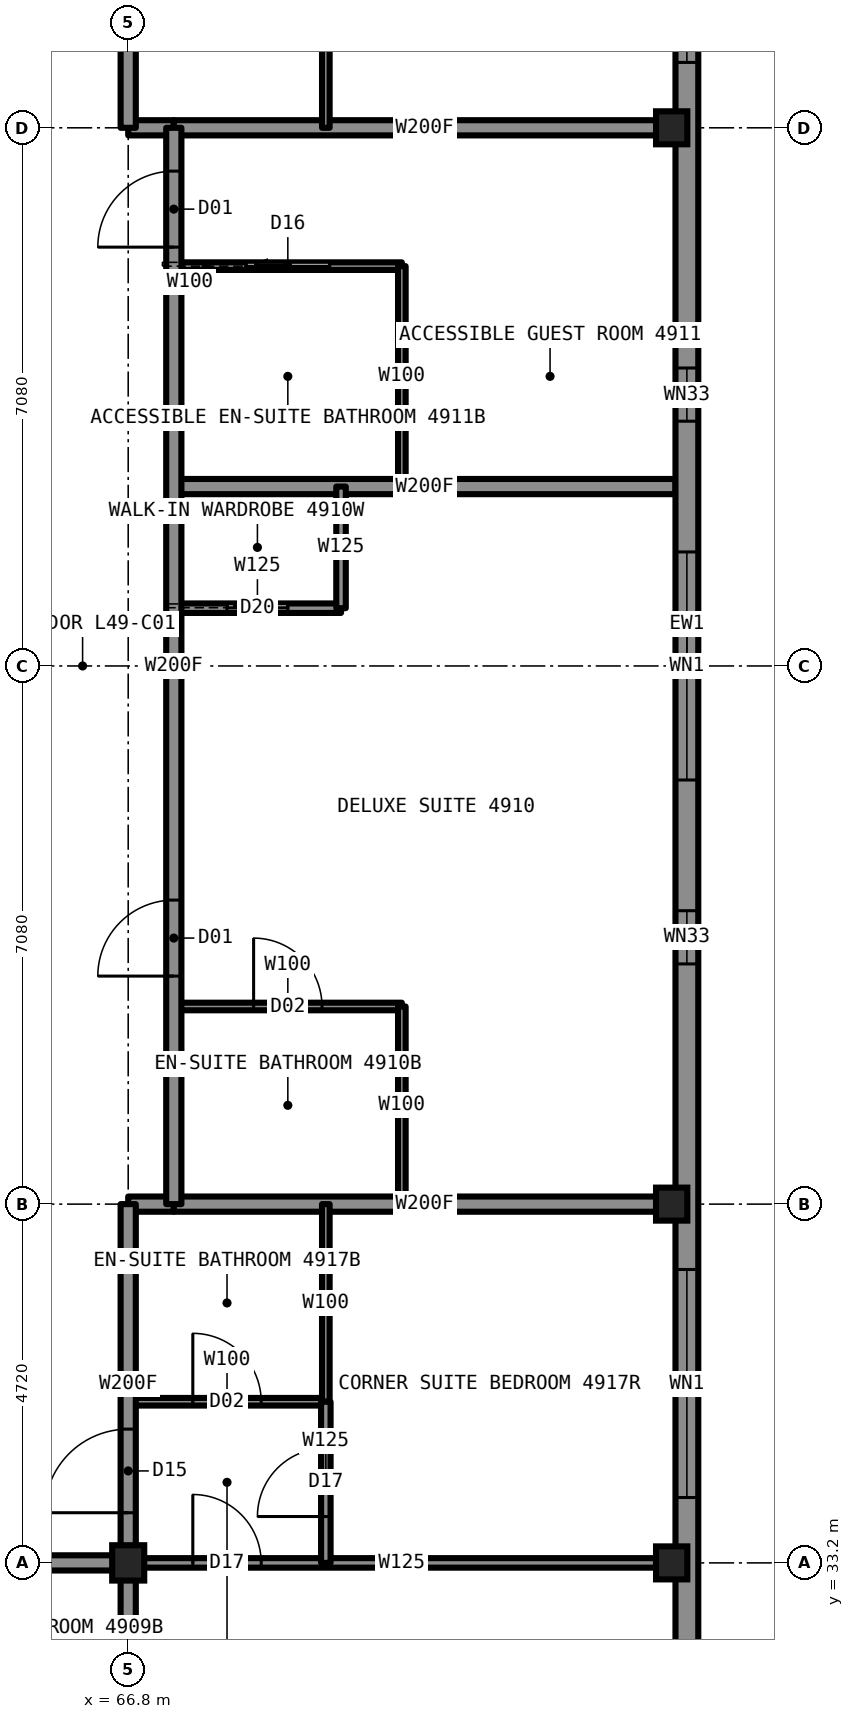
"""IFC4 building model, lengths in metres.
Left out: names, types, materials, properties, quantities, classifications, styles, units other than length and angle.
Written with IfcOpenShell. Run it as: python <this file> out.ifc"""

import sys

from ifc_helpers import new_model, si_unit, direction, frame, frame_2d, origin, origin_2d, place, context, subcontext, project, spatial, rectangle, i_section, extrude, element, fill, save


model = new_model("IFC4")
c1 = context("Model", 3, precision=1e-05, world=origin(), true_north=direction((0.0, 1.0)))
c2 = subcontext(c1, "Body", "Model", "MODEL_VIEW")
j1 = project(units=[si_unit("LENGTHUNIT", "METRE"), si_unit("PLANEANGLEUNIT", "RADIAN")], contexts=[c1])
p1 = place(None, origin())
s1 = spatial("IfcSite", under=j1, at=p1, CompositionType="ELEMENT")
p2 = place(p1, origin())
s2 = spatial("IfcBuilding", under=s1, at=p2, CompositionType="ELEMENT")
p3 = place(p2, frame((0.0, 0.0, 182.8)))
s3 = spatial("IfcBuildingStorey", under=s2, at=p3, CompositionType="ELEMENT", Elevation=182.8)
for number, where, z_axis, x_axis in (
    (1, (73.95, 33.2, 0.0), (0.0, 0.0, 1.0), (1.0, 0.0, 0.0)),
    (2, (73.95, 37.92, 0.0), (0.0, 0.0, 1.0), (1.0, 0.0, 0.0)),
    (3, (73.95, 52.08, 0.0), (0.0, 0.0, 1.0), (1.0, 0.0, 0.0)),
):
    element("IfcColumn", number, at=place(p3, frame(where, z_axis=z_axis, x_axis=x_axis)), inside=s3, PredefinedType="COLUMN", context=c2, shape_type="SweptSolid", body=[
        extrude(i_section(OverallWidth=0.411, OverallDepth=0.434, WebThickness=0.036, FlangeThickness=0.057, at=origin_2d()), origin(), (0.0, 0.0, 1.0), 3.5),
    ])
p4 = place(p3, frame((66.8, 33.2, 0.0), z_axis=(0.0, 0.0, 1.0), x_axis=(1.0, 0.0, 0.0)))
e4 = element("IfcColumn", 4, at=p4, inside=s3, PredefinedType="COLUMN", context=c2, shape_type="SweptSolid", body=[
    extrude(i_section(OverallWidth=0.422, OverallDepth=0.465, WebThickness=0.045, FlangeThickness=0.073, at=origin_2d()), origin(), (0.0, 0.0, 1.0), 3.5),
])
p5 = place(p3, frame((43.2, 33.2, 0.0), z_axis=(0.0, 0.0, 1.0), x_axis=(1.0, 0.0, 0.0)))
e5 = element("IfcWall", 5, at=p5, inside=s3, PredefinedType="PARTITIONING", context=c2, shape_type="SweptSolid", body=[
    extrude(rectangle(XDim=23.6, YDim=0.2, at=frame_2d((11.8, 0.0))), origin(), (0.0, 0.0, 1.0), 3.33),
])
p6 = place(p5, frame((3.0, 0.0, 0.0)))
e6 = element("IfcOpeningElement", 6, at=p6, cuts=e5, PredefinedType="OPENING", context=c2, shape_type="SweptSolid", body=[
    extrude(rectangle(XDim=1.0, YDim=2.2, at=frame_2d((0.5, 1.1))), frame((0.0, 0.11, 0.0), z_axis=(0.0, -1.0, 0.0), x_axis=(1.0, 0.0, 0.0)), (0.0, 0.0, 1.0), 0.22),
])
p7 = place(p5, frame((11.99, 0.0, 0.0)))
e7 = element("IfcOpeningElement", 7, at=p7, cuts=e5, PredefinedType="OPENING", context=c2, shape_type="SweptSolid", body=[
    extrude(rectangle(XDim=1.0, YDim=2.2, at=frame_2d((0.5, 1.1))), frame((0.0, 0.11, 0.0), z_axis=(0.0, -1.0, 0.0), x_axis=(1.0, 0.0, 0.0)), (0.0, 0.0, 1.0), 0.22),
])
p8 = place(p5, frame((16.71, 0.0, 0.0)))
e8 = element("IfcOpeningElement", 8, at=p8, cuts=e5, PredefinedType="OPENING", context=c2, shape_type="SweptSolid", body=[
    extrude(rectangle(XDim=1.0, YDim=2.2, at=frame_2d((0.5, 1.1))), frame((0.0, 0.11, 0.0), z_axis=(0.0, -1.0, 0.0), x_axis=(1.0, 0.0, 0.0)), (0.0, 0.0, 1.0), 0.22),
])
p9 = place(p5, frame((19.28, 0.0, 0.0)))
e9 = element("IfcOpeningElement", 9, at=p9, cuts=e5, PredefinedType="OPENING", context=c2, shape_type="SweptSolid", body=[
    extrude(rectangle(XDim=1.0, YDim=2.2, at=frame_2d((0.5, 1.1))), frame((0.0, 0.11, 0.0), z_axis=(0.0, -1.0, 0.0), x_axis=(1.0, 0.0, 0.0)), (0.0, 0.0, 1.0), 0.22),
])
p10 = place(p3, frame((66.8, 33.2, 0.0), z_axis=(0.0, 0.0, 1.0), x_axis=(1.0, 0.0, 0.0)))
e10 = element("IfcWall", 10, at=p10, inside=s3, PredefinedType="PARTITIONING", context=c2, shape_type="SweptSolid", body=[
    extrude(rectangle(XDim=7.2, YDim=0.125, at=frame_2d((3.6, 0.0))), origin(), (0.0, 0.0, 1.0), 2.573),
])
p11 = place(p10, frame((0.85, 0.0, 0.0)))
e11 = element("IfcOpeningElement", 11, at=p11, cuts=e10, PredefinedType="OPENING", context=c2, shape_type="SweptSolid", body=[
    extrude(rectangle(XDim=0.9, YDim=2.2, at=frame_2d((0.45, 1.1))), frame((0.0, 0.073, 0.0), z_axis=(0.0, -1.0, 0.0), x_axis=(1.0, 0.0, 0.0)), (0.0, 0.0, 1.0), 0.145),
])
p12 = place(p3, frame((67.4, 40.52, 0.0), z_axis=(0.0, 0.0, 1.0), x_axis=(1.0, 0.0, 0.0)))
e12 = element("IfcWall", 12, at=p12, inside=s3, PredefinedType="PARTITIONING", context=c2, shape_type="SweptSolid", body=[
    extrude(rectangle(XDim=3.0, YDim=0.1, at=frame_2d((1.5, 0.0))), origin(), (0.0, 0.0, 1.0), 3.33),
])
p13 = place(p12, frame((1.05, 0.0, 0.0)))
e13 = element("IfcOpeningElement", 13, at=p13, cuts=e12, PredefinedType="OPENING", context=c2, shape_type="SweptSolid", body=[
    extrude(rectangle(XDim=0.9, YDim=2.1, at=frame_2d((0.45, 1.05))), frame((0.0, 0.06, 0.0), z_axis=(0.0, -1.0, 0.0), x_axis=(1.0, 0.0, 0.0)), (0.0, 0.0, 1.0), 0.12),
])
p14 = place(p3, frame((66.8, 37.92, 0.0), z_axis=(0.0, 0.0, 1.0), x_axis=(1.0, 0.0, 0.0)))
e14 = element("IfcWall", 14, at=p14, inside=s3, PredefinedType="PARTITIONING", context=c2, shape_type="SweptSolid", body=[
    extrude(rectangle(XDim=0.6, YDim=0.2, at=frame_2d((0.3, 0.0))), origin(), (0.0, 0.0, 1.0), 2.573),
])
p15 = place(p3, frame((67.4, 37.92, 0.0), z_axis=(0.0, 0.0, 1.0), x_axis=(1.0, 0.0, 0.0)))
e15 = element("IfcWall", 15, at=p15, inside=s3, PredefinedType="PARTITIONING", context=c2, shape_type="SweptSolid", body=[
    extrude(rectangle(XDim=6.6, YDim=0.2, at=frame_2d((3.3, 0.0))), origin(), (0.0, 0.0, 1.0), 2.573),
])
p16 = place(p3, frame((66.8, 35.32, 0.0), z_axis=(0.0, 0.0, 1.0), x_axis=(1.0, 0.0, 0.0)))
e16 = element("IfcWall", 16, at=p16, inside=s3, PredefinedType="PARTITIONING", context=c2, shape_type="SweptSolid", body=[
    extrude(rectangle(XDim=2.6, YDim=0.1, at=frame_2d((1.3, 0.0))), origin(), (0.0, 0.0, 1.0), 3.33),
])
p17 = place(p16, frame((0.85, 0.0, 0.0)))
e17 = element("IfcOpeningElement", 17, at=p17, cuts=e16, PredefinedType="OPENING", context=c2, shape_type="SweptSolid", body=[
    extrude(rectangle(XDim=0.9, YDim=2.1, at=frame_2d((0.45, 1.05))), frame((0.0, 0.06, 0.0), z_axis=(0.0, -1.0, 0.0), x_axis=(1.0, 0.0, 0.0)), (0.0, 0.0, 1.0), 0.12),
])
p18 = place(p3, frame((67.4, 45.76, 0.0), z_axis=(0.0, 0.0, 1.0), x_axis=(1.0, 0.0, 0.0)))
e18 = element("IfcWall", 18, at=p18, inside=s3, PredefinedType="PARTITIONING", context=c2, shape_type="SweptSolid", body=[
    extrude(rectangle(XDim=2.2, YDim=0.125, at=frame_2d((1.1, 0.0))), origin(), (0.0, 0.0, 1.0), 3.33),
])
p19 = place(p18, frame((0.7, 0.0, 0.0)))
e19 = element("IfcOpeningElement", 19, at=p19, cuts=e18, PredefinedType="OPENING", context=c2, shape_type="SweptSolid", body=[
    extrude(rectangle(XDim=0.8, YDim=2.1, at=frame_2d((0.4, 1.05))), frame((0.0, 0.073, 0.0), z_axis=(0.0, -1.0, 0.0), x_axis=(1.0, 0.0, 0.0)), (0.0, 0.0, 1.0), 0.145),
])
p20 = place(p3, frame((67.4, 47.36, 0.0), z_axis=(0.0, 0.0, 1.0), x_axis=(1.0, 0.0, 0.0)))
e20 = element("IfcWall", 20, at=p20, inside=s3, PredefinedType="PARTITIONING", context=c2, shape_type="SweptSolid", body=[
    extrude(rectangle(XDim=6.6, YDim=0.2, at=frame_2d((3.3, 0.0))), origin(), (0.0, 0.0, 1.0), 2.73),
])
p21 = place(p3, frame((67.4, 50.26, 0.0), z_axis=(0.0, 0.0, 1.0), x_axis=(1.0, 0.0, 0.0)))
e21 = element("IfcWall", 21, at=p21, inside=s3, PredefinedType="PARTITIONING", context=c2, shape_type="SweptSolid", body=[
    extrude(rectangle(XDim=3.0, YDim=0.1, at=frame_2d((1.5, 0.0))), origin(), (0.0, 0.0, 1.0), 3.33),
])
p22 = place(p21, frame((0.95, 0.0, 0.0)))
e22 = element("IfcOpeningElement", 22, at=p22, cuts=e21, PredefinedType="OPENING", context=c2, shape_type="SweptSolid", body=[
    extrude(rectangle(XDim=1.1, YDim=2.1, at=frame_2d((0.55, 1.05))), frame((0.0, 0.06, 0.0), z_axis=(0.0, -1.0, 0.0), x_axis=(1.0, 0.0, 0.0)), (0.0, 0.0, 1.0), 0.12),
])
p23 = place(p3, frame((66.8, 52.08, 0.0), z_axis=(0.0, 0.0, 1.0), x_axis=(1.0, 0.0, 0.0)))
e23 = element("IfcWall", 23, at=p23, inside=s3, PredefinedType="PARTITIONING", context=c2, shape_type="SweptSolid", body=[
    extrude(rectangle(XDim=0.6, YDim=0.2, at=frame_2d((0.3, 0.0))), origin(), (0.0, 0.0, 1.0), 2.573),
])
p24 = place(p3, frame((67.4, 52.08, 0.0), z_axis=(0.0, 0.0, 1.0), x_axis=(1.0, 0.0, 0.0)))
e24 = element("IfcWall", 24, at=p24, inside=s3, PredefinedType="PARTITIONING", context=c2, shape_type="SweptSolid", body=[
    extrude(rectangle(XDim=6.6, YDim=0.2, at=frame_2d((3.3, 0.0))), origin(), (0.0, 0.0, 1.0), 2.573),
])
p25 = place(p3, frame((66.8, 33.2, 0.0), z_axis=(0.0, 0.0, 1.0), x_axis=(0.0, 1.0, 0.0)))
e25 = element("IfcWall", 25, at=p25, inside=s3, PredefinedType="PARTITIONING", context=c2, shape_type="SweptSolid", body=[
    extrude(rectangle(XDim=4.72, YDim=0.2, at=frame_2d((2.36, 0.0))), origin(), (0.0, 0.0, 1.0), 3.33),
])
p26 = place(p25, frame((0.66, 0.0, 0.0)))
e26 = element("IfcOpeningElement", 26, at=p26, cuts=e25, PredefinedType="OPENING", context=c2, shape_type="SweptSolid", body=[
    extrude(rectangle(XDim=1.1, YDim=2.2, at=frame_2d((0.55, 1.1))), frame((0.0, 0.11, 0.0), z_axis=(0.0, -1.0, 0.0), x_axis=(1.0, 0.0, 0.0)), (0.0, 0.0, 1.0), 0.22),
])
p27 = place(p3, frame((66.8, 52.08, 0.0), z_axis=(0.0, 0.0, 1.0), x_axis=(0.0, 1.0, 0.0)))
e27 = element("IfcWall", 27, at=p27, inside=s3, PredefinedType="PARTITIONING", context=c2, shape_type="SweptSolid", body=[
    extrude(rectangle(XDim=4.7, YDim=0.2, at=frame_2d((2.35, 0.0))), origin(), (0.0, 0.0, 1.0), 3.33),
])
p28 = place(p27, frame((3.17, 0.0, 0.0)))
e28 = element("IfcOpeningElement", 28, at=p28, cuts=e27, PredefinedType="OPENING", context=c2, shape_type="SweptSolid", body=[
    extrude(rectangle(XDim=1.1, YDim=2.2, at=frame_2d((0.55, 1.1))), frame((0.0, 0.11, 0.0), z_axis=(0.0, -1.0, 0.0), x_axis=(1.0, 0.0, 0.0)), (0.0, 0.0, 1.0), 0.22),
])
p29 = place(p3, frame((66.8, 26.0, 0.0), z_axis=(0.0, 0.0, 1.0), x_axis=(0.0, 1.0, 0.0)))
e29 = element("IfcWall", 29, at=p29, inside=s3, PredefinedType="PARTITIONING", context=c2, shape_type="SweptSolid", body=[
    extrude(rectangle(XDim=7.2, YDim=0.2, at=frame_2d((3.6, 0.0))), origin(), (0.0, 0.0, 1.0), 2.573),
])
p30 = place(p3, frame((67.4, 37.92, 0.0), z_axis=(0.0, 0.0, 1.0), x_axis=(0.0, 1.0, 0.0)))
e30 = element("IfcWall", 30, at=p30, inside=s3, PredefinedType="PARTITIONING", context=c2, shape_type="SweptSolid", body=[
    extrude(rectangle(XDim=14.16, YDim=0.2, at=frame_2d((7.08, 0.0))), origin(), (0.0, 0.0, 1.0), 3.33),
])
p31 = place(p30, frame((3.0, 0.0, 0.0)))
e31 = element("IfcOpeningElement", 31, at=p31, cuts=e30, PredefinedType="OPENING", context=c2, shape_type="SweptSolid", body=[
    extrude(rectangle(XDim=1.0, YDim=2.2, at=frame_2d((0.5, 1.1))), frame((0.0, 0.11, 0.0), z_axis=(0.0, -1.0, 0.0), x_axis=(1.0, 0.0, 0.0)), (0.0, 0.0, 1.0), 0.22),
])
p32 = place(p30, frame((12.59, 0.0, 0.0)))
e32 = element("IfcOpeningElement", 32, at=p32, cuts=e30, PredefinedType="OPENING", context=c2, shape_type="SweptSolid", body=[
    extrude(rectangle(XDim=1.0, YDim=2.2, at=frame_2d((0.5, 1.1))), frame((0.0, 0.11, 0.0), z_axis=(0.0, -1.0, 0.0), x_axis=(1.0, 0.0, 0.0)), (0.0, 0.0, 1.0), 0.22),
])
for number, where, z_axis, x_axis in (
    (33, (69.4, 35.32, 0.0), (0.0, 0.0, 1.0), (0.0, 1.0, 0.0)),
    (34, (69.4, 52.08, 0.0), (0.0, 0.0, 1.0), (0.0, 1.0, 0.0)),
):
    element("IfcWall", number, at=place(p3, frame(where, z_axis=z_axis, x_axis=x_axis)), inside=s3, PredefinedType="PARTITIONING", context=c2, shape_type="SweptSolid", body=[
        extrude(rectangle(XDim=2.6, YDim=0.1, at=frame_2d((1.3, 0.0))), origin(), (0.0, 0.0, 1.0), 3.33),
    ])
p33 = place(p3, frame((69.4, 33.2, 0.0), z_axis=(0.0, 0.0, 1.0), x_axis=(0.0, 1.0, 0.0)))
e35 = element("IfcWall", 35, at=p33, inside=s3, PredefinedType="PARTITIONING", context=c2, shape_type="SweptSolid", body=[
    extrude(rectangle(XDim=2.12, YDim=0.125, at=frame_2d((1.06, 0.0))), origin(), (0.0, 0.0, 1.0), 3.33),
])
p34 = place(p33, frame((0.61, 0.0, 0.0)))
e36 = element("IfcOpeningElement", 36, at=p34, cuts=e35, PredefinedType="OPENING", context=c2, shape_type="SweptSolid", body=[
    extrude(rectangle(XDim=0.9, YDim=2.2, at=frame_2d((0.45, 1.1))), frame((0.0, 0.073, 0.0), z_axis=(0.0, -1.0, 0.0), x_axis=(1.0, 0.0, 0.0)), (0.0, 0.0, 1.0), 0.145),
])
p35 = place(p3, frame((69.6, 45.76, 0.0), z_axis=(0.0, 0.0, 1.0), x_axis=(0.0, 1.0, 0.0)))
e37 = element("IfcWall", 37, at=p35, inside=s3, PredefinedType="PARTITIONING", context=c2, shape_type="SweptSolid", body=[
    extrude(rectangle(XDim=1.6, YDim=0.125, at=frame_2d((0.8, 0.0))), origin(), (0.0, 0.0, 1.0), 3.33),
])
p36 = place(p3, frame((70.4, 37.92, 0.0), z_axis=(0.0, 0.0, 1.0), x_axis=(0.0, 1.0, 0.0)))
e38 = element("IfcWall", 38, at=p36, inside=s3, PredefinedType="PARTITIONING", context=c2, shape_type="SweptSolid", body=[
    extrude(rectangle(XDim=2.6, YDim=0.1, at=frame_2d((1.3, 0.0))), origin(), (0.0, 0.0, 1.0), 3.33),
])
p37 = place(p3, frame((70.4, 47.36, 0.0), z_axis=(0.0, 0.0, 1.0), x_axis=(0.0, 1.0, 0.0)))
e39 = element("IfcWall", 39, at=p37, inside=s3, PredefinedType="PARTITIONING", context=c2, shape_type="SweptSolid", body=[
    extrude(rectangle(XDim=2.9, YDim=0.1, at=frame_2d((1.45, 0.0))), origin(), (0.0, 0.0, 1.0), 3.33),
])
p38 = place(p3, frame((74.15, 31.2, 0.0), z_axis=(0.0, 0.0, 1.0), x_axis=(0.0, 1.0, 0.0)))
e40 = element("IfcWall", 40, at=p38, inside=s3, PredefinedType="SOLIDWALL", context=c2, shape_type="SweptSolid", body=[
    extrude(rectangle(XDim=27.6, YDim=0.3, at=frame_2d((13.8, 0.0))), origin(), (0.0, 0.0, 1.0), 2.83),
])
p39 = place(p38, frame((2.86, 0.0, 0.3)))
e41 = element("IfcOpeningElement", 41, at=p39, cuts=e40, PredefinedType="OPENING", context=c2, shape_type="SweptSolid", body=[
    extrude(rectangle(XDim=3.0, YDim=2.0, at=frame_2d((1.5, 1.0))), frame((0.0, 0.16, 0.0), z_axis=(0.0, -1.0, 0.0), x_axis=(1.0, 0.0, 0.0)), (0.0, 0.0, 1.0), 0.32),
])
p40 = place(p38, frame((9.88, 0.0, 0.3)))
e42 = element("IfcOpeningElement", 42, at=p40, cuts=e40, PredefinedType="OPENING", context=c2, shape_type="SweptSolid", body=[
    extrude(rectangle(XDim=0.7, YDim=1.1, at=frame_2d((0.35, 0.55))), frame((0.0, 0.16, 0.0), z_axis=(0.0, -1.0, 0.0), x_axis=(1.0, 0.0, 0.0)), (0.0, 0.0, 1.0), 0.32),
])
p41 = place(p38, frame((12.3, 0.0, 0.3)))
e43 = element("IfcOpeningElement", 43, at=p41, cuts=e40, PredefinedType="OPENING", context=c2, shape_type="SweptSolid", body=[
    extrude(rectangle(XDim=3.0, YDim=2.0, at=frame_2d((1.5, 1.0))), frame((0.0, 0.16, 0.0), z_axis=(0.0, -1.0, 0.0), x_axis=(1.0, 0.0, 0.0)), (0.0, 0.0, 1.0), 0.32),
])
p42 = place(p38, frame((17.02, 0.0, 0.3)))
e44 = element("IfcOpeningElement", 44, at=p42, cuts=e40, PredefinedType="OPENING", context=c2, shape_type="SweptSolid", body=[
    extrude(rectangle(XDim=0.7, YDim=1.1, at=frame_2d((0.35, 0.55))), frame((0.0, 0.16, 0.0), z_axis=(0.0, -1.0, 0.0), x_axis=(1.0, 0.0, 0.0)), (0.0, 0.0, 1.0), 0.32),
])
p43 = place(p38, frame((21.74, 0.0, 0.3)))
e45 = element("IfcOpeningElement", 45, at=p43, cuts=e40, PredefinedType="OPENING", context=c2, shape_type="SweptSolid", body=[
    extrude(rectangle(XDim=3.0, YDim=2.0, at=frame_2d((1.5, 1.0))), frame((0.0, 0.16, 0.0), z_axis=(0.0, -1.0, 0.0), x_axis=(1.0, 0.0, 0.0)), (0.0, 0.0, 1.0), 0.32),
])
p44 = place(p31, origin())
e46 = element("IfcDoor", 46, at=p44, inside=s3, OperationType="SINGLE_SWING_LEFT", PredefinedType="DOOR", context=c2, shape_type="SweptSolid", body=[
    extrude(rectangle(XDim=1.0, YDim=2.2, at=frame_2d((0.5, 1.1))), frame((0.0, 0.025, 0.0), z_axis=(0.0, -1.0, 0.0), x_axis=(1.0, 0.0, 0.0)), (0.0, 0.0, 1.0), 0.05),
])
fill(e31, e46)
p45 = place(p13, origin())
e47 = element("IfcDoor", 47, at=p45, inside=s3, OperationType="SINGLE_SWING_RIGHT", PredefinedType="DOOR", context=c2, shape_type="SweptSolid", body=[
    extrude(rectangle(XDim=0.9, YDim=2.1, at=frame_2d((0.45, 1.05))), frame((0.0, 0.025, 0.0), z_axis=(0.0, -1.0, 0.0), x_axis=(1.0, 0.0, 0.0)), (0.0, 0.0, 1.0), 0.05),
])
fill(e13, e47)
p46 = place(p19, origin())
e48 = element("IfcDoor", 48, at=p46, inside=s3, OperationType="SLIDING_TO_LEFT", PredefinedType="DOOR", context=c2, shape_type="SweptSolid", body=[
    extrude(rectangle(XDim=0.8, YDim=2.1, at=frame_2d((0.4, 1.05))), frame((0.0, 0.025, 0.0), z_axis=(0.0, -1.0, 0.0), x_axis=(1.0, 0.0, 0.0)), (0.0, 0.0, 1.0), 0.05),
])
fill(e19, e48)
p47 = place(p32, origin())
e49 = element("IfcDoor", 49, at=p47, inside=s3, OperationType="SINGLE_SWING_LEFT", PredefinedType="DOOR", context=c2, shape_type="SweptSolid", body=[
    extrude(rectangle(XDim=1.0, YDim=2.2, at=frame_2d((0.5, 1.1))), frame((0.0, 0.025, 0.0), z_axis=(0.0, -1.0, 0.0), x_axis=(1.0, 0.0, 0.0)), (0.0, 0.0, 1.0), 0.05),
])
fill(e32, e49)
p48 = place(p22, origin())
e50 = element("IfcDoor", 50, at=p48, inside=s3, OperationType="SLIDING_TO_LEFT", PredefinedType="DOOR", context=c2, shape_type="SweptSolid", body=[
    extrude(rectangle(XDim=1.1, YDim=2.1, at=frame_2d((0.55, 1.05))), frame((0.0, 0.025, 0.0), z_axis=(0.0, -1.0, 0.0), x_axis=(1.0, 0.0, 0.0)), (0.0, 0.0, 1.0), 0.05),
])
fill(e22, e50)
p49 = place(p11, origin())
e51 = element("IfcDoor", 51, at=p49, inside=s3, OperationType="SINGLE_SWING_LEFT", PredefinedType="DOOR", context=c2, shape_type="SweptSolid", body=[
    extrude(rectangle(XDim=0.9, YDim=2.2, at=frame_2d((0.45, 1.1))), frame((0.0, 0.025, 0.0), z_axis=(0.0, -1.0, 0.0), x_axis=(1.0, 0.0, 0.0)), (0.0, 0.0, 1.0), 0.05),
])
fill(e11, e51)
p50 = place(p17, origin())
e52 = element("IfcDoor", 52, at=p50, inside=s3, OperationType="SINGLE_SWING_RIGHT", PredefinedType="DOOR", context=c2, shape_type="SweptSolid", body=[
    extrude(rectangle(XDim=0.9, YDim=2.1, at=frame_2d((0.45, 1.05))), frame((0.0, 0.025, 0.0), z_axis=(0.0, -1.0, 0.0), x_axis=(1.0, 0.0, 0.0)), (0.0, 0.0, 1.0), 0.05),
])
fill(e17, e52)
p51 = place(p26, origin())
e53 = element("IfcDoor", 53, at=p51, inside=s3, OperationType="SINGLE_SWING_LEFT", PredefinedType="DOOR", context=c2, shape_type="SweptSolid", body=[
    extrude(rectangle(XDim=1.1, YDim=2.2, at=frame_2d((0.55, 1.1))), frame((0.0, 0.025, 0.0), z_axis=(0.0, -1.0, 0.0), x_axis=(1.0, 0.0, 0.0)), (0.0, 0.0, 1.0), 0.05),
])
fill(e26, e53)
p52 = place(p34, origin())
e54 = element("IfcDoor", 54, at=p52, inside=s3, OperationType="SINGLE_SWING_LEFT", PredefinedType="DOOR", context=c2, shape_type="SweptSolid", body=[
    extrude(rectangle(XDim=0.9, YDim=2.2, at=frame_2d((0.45, 1.1))), frame((0.0, 0.025, 0.0), z_axis=(0.0, -1.0, 0.0), x_axis=(1.0, 0.0, 0.0)), (0.0, 0.0, 1.0), 0.05),
])
fill(e36, e54)
p53 = place(p39, origin())
e55 = element("IfcWindow", 55, at=p53, inside=s3, PartitioningType="SINGLE_PANEL", PredefinedType="WINDOW", context=c2, shape_type="SweptSolid", body=[
    extrude(rectangle(XDim=3.0, YDim=2.0, at=frame_2d((1.5, 1.0))), frame((0.0, 0.13, 0.0), z_axis=(0.0, -1.0, 0.0), x_axis=(1.0, 0.0, 0.0)), (0.0, 0.0, 1.0), 0.06),
])
fill(e41, e55)
p54 = place(p40, origin())
e56 = element("IfcWindow", 56, at=p54, inside=s3, PartitioningType="SINGLE_PANEL", PredefinedType="WINDOW", context=c2, shape_type="SweptSolid", body=[
    extrude(rectangle(XDim=0.7, YDim=1.1, at=frame_2d((0.35, 0.55))), frame((0.0, 0.13, 0.0), z_axis=(0.0, -1.0, 0.0), x_axis=(1.0, 0.0, 0.0)), (0.0, 0.0, 1.0), 0.06),
])
fill(e42, e56)
p55 = place(p41, origin())
e57 = element("IfcWindow", 57, at=p55, inside=s3, PartitioningType="SINGLE_PANEL", PredefinedType="WINDOW", context=c2, shape_type="SweptSolid", body=[
    extrude(rectangle(XDim=3.0, YDim=2.0, at=frame_2d((1.5, 1.0))), frame((0.0, 0.13, 0.0), z_axis=(0.0, -1.0, 0.0), x_axis=(1.0, 0.0, 0.0)), (0.0, 0.0, 1.0), 0.06),
])
fill(e43, e57)
p56 = place(p42, origin())
e58 = element("IfcWindow", 58, at=p56, inside=s3, PartitioningType="SINGLE_PANEL", PredefinedType="WINDOW", context=c2, shape_type="SweptSolid", body=[
    extrude(rectangle(XDim=0.7, YDim=1.1, at=frame_2d((0.35, 0.55))), frame((0.0, 0.13, 0.0), z_axis=(0.0, -1.0, 0.0), x_axis=(1.0, 0.0, 0.0)), (0.0, 0.0, 1.0), 0.06),
])
fill(e44, e58)
p57 = place(p43, origin())
e59 = element("IfcWindow", 59, at=p57, inside=s3, PartitioningType="SINGLE_PANEL", PredefinedType="WINDOW", context=c2, shape_type="SweptSolid", body=[
    extrude(rectangle(XDim=3.0, YDim=2.0, at=frame_2d((1.5, 1.0))), frame((0.0, 0.13, 0.0), z_axis=(0.0, -1.0, 0.0), x_axis=(1.0, 0.0, 0.0)), (0.0, 0.0, 1.0), 0.06),
])
fill(e45, e59)
save(model, sys.argv[1])
